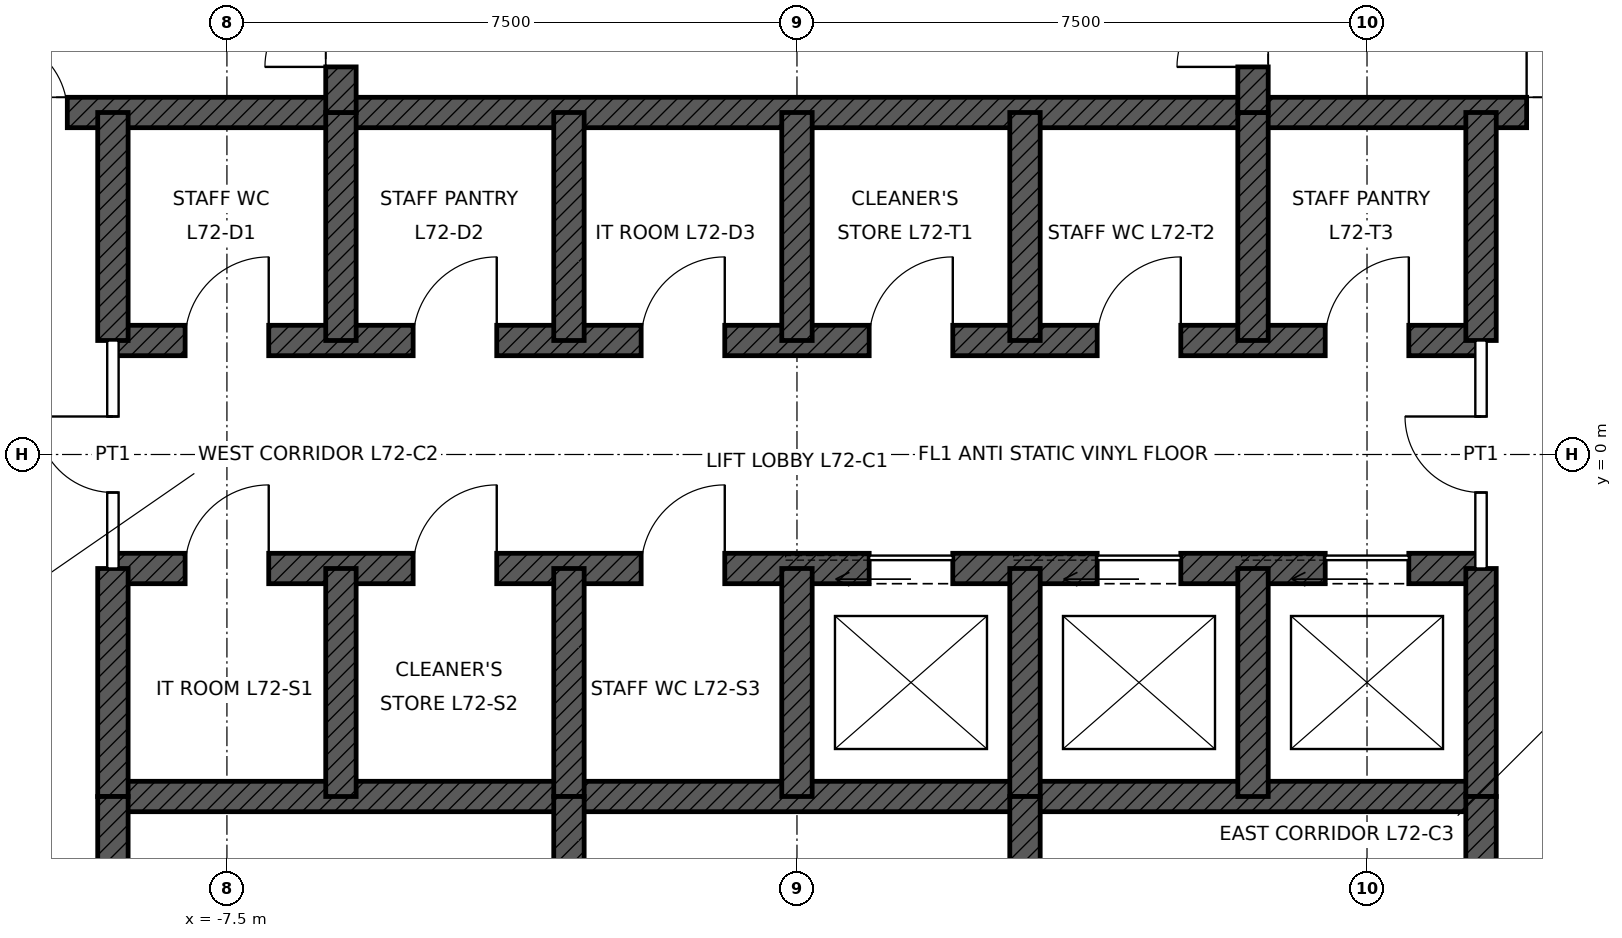
"""IFC4 building model, lengths in metres.
Left out: names, types, materials, properties, quantities, classifications, styles, units other than length and angle.
Written with IfcOpenShell. Run it as: python <this file> out.ifc"""

import sys

from ifc_helpers import new_model, si_unit, direction, frame, frame_2d, origin, place, context, subcontext, project, spatial, rectangle, extrude, element, fill, save


model = new_model("IFC4")
c1 = context("Model", 3, precision=1e-05, world=origin(), true_north=direction((0.0, 1.0)))
c2 = subcontext(c1, "Body", "Model", "MODEL_VIEW")
j1 = project(units=[si_unit("LENGTHUNIT", "METRE"), si_unit("PLANEANGLEUNIT", "RADIAN")], contexts=[c1])
p1 = place(None, origin())
s1 = spatial("IfcSite", under=j1, at=p1, CompositionType="ELEMENT")
p2 = place(p1, origin())
s2 = spatial("IfcBuilding", under=s1, at=p2, CompositionType="ELEMENT")
p3 = place(p2, frame((0.0, 0.0, 323.9)))
s3 = spatial("IfcBuildingStorey", under=s2, at=p3, CompositionType="ELEMENT", Elevation=323.9)
p4 = place(p3, frame((-11.0, 4.5, 0.0), z_axis=(0.0, 0.0, 1.0), x_axis=(1.0, 0.0, 0.0)))
e1 = element("IfcWall", 1, at=p4, inside=s3, PredefinedType="SHEAR", context=c2, shape_type="SweptSolid", body=[
    extrude(rectangle(XDim=22.0, YDim=0.4, at=frame_2d((11.0, 0.0))), origin(), (0.0, 0.0, 1.0), 4.0),
])
p5 = place(p4, frame((0.4, 0.0, 0.0)))
e2 = element("IfcOpeningElement", 2, at=p5, cuts=e1, PredefinedType="OPENING", context=c2, shape_type="SweptSolid", body=[
    extrude(rectangle(XDim=1.0, YDim=2.1, at=frame_2d((0.5, 1.05))), frame((0.0, 0.21, 0.0), z_axis=(0.0, -1.0, 0.0), x_axis=(1.0, 0.0, 0.0)), (0.0, 0.0, 1.0), 0.42),
])
p6 = place(p4, frame((20.6, 0.0, 0.0)))
e3 = element("IfcOpeningElement", 3, at=p6, cuts=e1, PredefinedType="OPENING", context=c2, shape_type="SweptSolid", body=[
    extrude(rectangle(XDim=1.0, YDim=2.1, at=frame_2d((0.5, 1.05))), frame((0.0, 0.21, 0.0), z_axis=(0.0, -1.0, 0.0), x_axis=(1.0, 0.0, 0.0)), (0.0, 0.0, 1.0), 0.42),
])
p7 = place(p3, frame((-9.0, 1.5, 0.0), z_axis=(0.0, 0.0, 1.0), x_axis=(1.0, 0.0, 0.0)))
e4 = element("IfcWall", 4, at=p7, inside=s3, PredefinedType="SHEAR", context=c2, shape_type="SweptSolid", body=[
    extrude(rectangle(XDim=18.0, YDim=0.4, at=frame_2d((9.0, 0.0))), origin(), (0.0, 0.0, 1.0), 4.0),
])
p8 = place(p7, frame((0.95, 0.0, 0.0)))
e5 = element("IfcOpeningElement", 5, at=p8, cuts=e4, PredefinedType="OPENING", context=c2, shape_type="SweptSolid", body=[
    extrude(rectangle(XDim=1.1, YDim=2.1, at=frame_2d((0.55, 1.05))), frame((0.0, 0.21, 0.0), z_axis=(0.0, -1.0, 0.0), x_axis=(1.0, 0.0, 0.0)), (0.0, 0.0, 1.0), 0.42),
])
p9 = place(p7, frame((3.95, 0.0, 0.0)))
e6 = element("IfcOpeningElement", 6, at=p9, cuts=e4, PredefinedType="OPENING", context=c2, shape_type="SweptSolid", body=[
    extrude(rectangle(XDim=1.1, YDim=2.1, at=frame_2d((0.55, 1.05))), frame((0.0, 0.21, 0.0), z_axis=(0.0, -1.0, 0.0), x_axis=(1.0, 0.0, 0.0)), (0.0, 0.0, 1.0), 0.42),
])
p10 = place(p7, frame((6.95, 0.0, 0.0)))
e7 = element("IfcOpeningElement", 7, at=p10, cuts=e4, PredefinedType="OPENING", context=c2, shape_type="SweptSolid", body=[
    extrude(rectangle(XDim=1.1, YDim=2.1, at=frame_2d((0.55, 1.05))), frame((0.0, 0.21, 0.0), z_axis=(0.0, -1.0, 0.0), x_axis=(1.0, 0.0, 0.0)), (0.0, 0.0, 1.0), 0.42),
])
p11 = place(p7, frame((9.95, 0.0, 0.0)))
e8 = element("IfcOpeningElement", 8, at=p11, cuts=e4, PredefinedType="OPENING", context=c2, shape_type="SweptSolid", body=[
    extrude(rectangle(XDim=1.1, YDim=2.1, at=frame_2d((0.55, 1.05))), frame((0.0, 0.21, 0.0), z_axis=(0.0, -1.0, 0.0), x_axis=(1.0, 0.0, 0.0)), (0.0, 0.0, 1.0), 0.42),
])
p12 = place(p7, frame((12.95, 0.0, 0.0)))
e9 = element("IfcOpeningElement", 9, at=p12, cuts=e4, PredefinedType="OPENING", context=c2, shape_type="SweptSolid", body=[
    extrude(rectangle(XDim=1.1, YDim=2.1, at=frame_2d((0.55, 1.05))), frame((0.0, 0.21, 0.0), z_axis=(0.0, -1.0, 0.0), x_axis=(1.0, 0.0, 0.0)), (0.0, 0.0, 1.0), 0.42),
])
p13 = place(p7, frame((15.95, 0.0, 0.0)))
e10 = element("IfcOpeningElement", 10, at=p13, cuts=e4, PredefinedType="OPENING", context=c2, shape_type="SweptSolid", body=[
    extrude(rectangle(XDim=1.1, YDim=2.1, at=frame_2d((0.55, 1.05))), frame((0.0, 0.21, 0.0), z_axis=(0.0, -1.0, 0.0), x_axis=(1.0, 0.0, 0.0)), (0.0, 0.0, 1.0), 0.42),
])
p14 = place(p3, frame((-9.0, -1.5, 0.0), z_axis=(0.0, 0.0, 1.0), x_axis=(1.0, 0.0, 0.0)))
e11 = element("IfcWall", 11, at=p14, inside=s3, PredefinedType="SHEAR", context=c2, shape_type="SweptSolid", body=[
    extrude(rectangle(XDim=18.0, YDim=0.4, at=frame_2d((9.0, 0.0))), origin(), (0.0, 0.0, 1.0), 4.0),
])
p15 = place(p14, frame((9.95, 0.0, 0.0)))
e12 = element("IfcOpeningElement", 12, at=p15, cuts=e11, PredefinedType="OPENING", context=c2, shape_type="SweptSolid", body=[
    extrude(rectangle(XDim=1.1, YDim=2.1, at=frame_2d((0.55, 1.05))), frame((0.0, 0.21, 0.0), z_axis=(0.0, -1.0, 0.0), x_axis=(1.0, 0.0, 0.0)), (0.0, 0.0, 1.0), 0.42),
])
p16 = place(p14, frame((12.95, 0.0, 0.0)))
e13 = element("IfcOpeningElement", 13, at=p16, cuts=e11, PredefinedType="OPENING", context=c2, shape_type="SweptSolid", body=[
    extrude(rectangle(XDim=1.1, YDim=2.1, at=frame_2d((0.55, 1.05))), frame((0.0, 0.21, 0.0), z_axis=(0.0, -1.0, 0.0), x_axis=(1.0, 0.0, 0.0)), (0.0, 0.0, 1.0), 0.42),
])
p17 = place(p14, frame((15.95, 0.0, 0.0)))
e14 = element("IfcOpeningElement", 14, at=p17, cuts=e11, PredefinedType="OPENING", context=c2, shape_type="SweptSolid", body=[
    extrude(rectangle(XDim=1.1, YDim=2.1, at=frame_2d((0.55, 1.05))), frame((0.0, 0.21, 0.0), z_axis=(0.0, -1.0, 0.0), x_axis=(1.0, 0.0, 0.0)), (0.0, 0.0, 1.0), 0.42),
])
p18 = place(p14, frame((0.95, 0.0, 0.0)))
e15 = element("IfcOpeningElement", 15, at=p18, cuts=e11, PredefinedType="OPENING", context=c2, shape_type="SweptSolid", body=[
    extrude(rectangle(XDim=1.1, YDim=2.1, at=frame_2d((0.55, 1.05))), frame((0.0, 0.21, 0.0), z_axis=(0.0, -1.0, 0.0), x_axis=(1.0, 0.0, 0.0)), (0.0, 0.0, 1.0), 0.42),
])
p19 = place(p14, frame((3.95, 0.0, 0.0)))
e16 = element("IfcOpeningElement", 16, at=p19, cuts=e11, PredefinedType="OPENING", context=c2, shape_type="SweptSolid", body=[
    extrude(rectangle(XDim=1.1, YDim=2.1, at=frame_2d((0.55, 1.05))), frame((0.0, 0.21, 0.0), z_axis=(0.0, -1.0, 0.0), x_axis=(1.0, 0.0, 0.0)), (0.0, 0.0, 1.0), 0.42),
])
p20 = place(p14, frame((6.95, 0.0, 0.0)))
e17 = element("IfcOpeningElement", 17, at=p20, cuts=e11, PredefinedType="OPENING", context=c2, shape_type="SweptSolid", body=[
    extrude(rectangle(XDim=1.1, YDim=2.1, at=frame_2d((0.55, 1.05))), frame((0.0, 0.21, 0.0), z_axis=(0.0, -1.0, 0.0), x_axis=(1.0, 0.0, 0.0)), (0.0, 0.0, 1.0), 0.42),
])
p21 = place(p3, frame((-9.0, -4.5, 0.0), z_axis=(0.0, 0.0, 1.0), x_axis=(1.0, 0.0, 0.0)))
e18 = element("IfcWall", 18, at=p21, inside=s3, PredefinedType="SHEAR", context=c2, shape_type="SweptSolid", body=[
    extrude(rectangle(XDim=18.0, YDim=0.4, at=frame_2d((9.0, 0.0))), origin(), (0.0, 0.0, 1.0), 4.0),
])
for number, where, z_axis, x_axis in (
    (19, (-9.0, 1.5, 0.0), (0.0, 0.0, 1.0), (0.0, 1.0, 0.0)),
    (20, (9.0, 1.5, 0.0), (0.0, 0.0, 1.0), (0.0, 1.0, 0.0)),
    (21, (-9.0, -4.5, 0.0), (0.0, 0.0, 1.0), (0.0, 1.0, 0.0)),
    (22, (9.0, -4.5, 0.0), (0.0, 0.0, 1.0), (0.0, 1.0, 0.0)),
    (23, (-6.0, 1.5, 0.0), (0.0, 0.0, 1.0), (0.0, 1.0, 0.0)),
    (24, (-3.0, 1.5, 0.0), (0.0, 0.0, 1.0), (0.0, 1.0, 0.0)),
    (25, (0.0, 1.5, 0.0), (0.0, 0.0, 1.0), (0.0, 1.0, 0.0)),
    (26, (3.0, 1.5, 0.0), (0.0, 0.0, 1.0), (0.0, 1.0, 0.0)),
    (27, (6.0, 1.5, 0.0), (0.0, 0.0, 1.0), (0.0, 1.0, 0.0)),
    (28, (-6.0, -4.5, 0.0), (0.0, 0.0, 1.0), (0.0, 1.0, 0.0)),
    (29, (-3.0, -4.5, 0.0), (0.0, 0.0, 1.0), (0.0, 1.0, 0.0)),
    (30, (0.0, -4.5, 0.0), (0.0, 0.0, 1.0), (0.0, 1.0, 0.0)),
    (31, (3.0, -4.5, 0.0), (0.0, 0.0, 1.0), (0.0, 1.0, 0.0)),
    (32, (6.0, -4.5, 0.0), (0.0, 0.0, 1.0), (0.0, 1.0, 0.0)),
):
    element("IfcWall", number, at=place(p3, frame(where, z_axis=z_axis, x_axis=x_axis)), inside=s3, PredefinedType="SHEAR", context=c2, shape_type="SweptSolid", body=[
        extrude(rectangle(XDim=3.0, YDim=0.4, at=frame_2d((1.5, 0.0))), origin(), (0.0, 0.0, 1.0), 4.0),
    ])
p22 = place(p3, frame((-6.0, 4.5, 0.0), z_axis=(0.0, 0.0, 1.0), x_axis=(0.0, 1.0, 0.0)))
e33 = element("IfcWall", 33, at=p22, inside=s3, PredefinedType="SHEAR", context=c2, shape_type="SweptSolid", body=[
    extrude(rectangle(XDim=6.5, YDim=0.4, at=frame_2d((3.25, 0.0))), origin(), (0.0, 0.0, 1.0), 4.0),
])
p23 = place(p22, frame((0.6, 0.0, 0.0)))
e34 = element("IfcOpeningElement", 34, at=p23, cuts=e33, PredefinedType="OPENING", context=c2, shape_type="SweptSolid", body=[
    extrude(rectangle(XDim=1.0, YDim=2.1, at=frame_2d((0.5, 1.05))), frame((0.0, 0.21, 0.0), z_axis=(0.0, -1.0, 0.0), x_axis=(1.0, 0.0, 0.0)), (0.0, 0.0, 1.0), 0.42),
])
p24 = place(p3, frame((6.0, 4.5, 0.0), z_axis=(0.0, 0.0, 1.0), x_axis=(0.0, 1.0, 0.0)))
e35 = element("IfcWall", 35, at=p24, inside=s3, PredefinedType="SHEAR", context=c2, shape_type="SweptSolid", body=[
    extrude(rectangle(XDim=6.5, YDim=0.4, at=frame_2d((3.25, 0.0))), origin(), (0.0, 0.0, 1.0), 4.0),
])
p25 = place(p24, frame((0.6, 0.0, 0.0)))
e36 = element("IfcOpeningElement", 36, at=p25, cuts=e35, PredefinedType="OPENING", context=c2, shape_type="SweptSolid", body=[
    extrude(rectangle(XDim=1.0, YDim=2.1, at=frame_2d((0.5, 1.05))), frame((0.0, 0.21, 0.0), z_axis=(0.0, -1.0, 0.0), x_axis=(1.0, 0.0, 0.0)), (0.0, 0.0, 1.0), 0.42),
])
p26 = place(p3, frame((-9.0, -11.0, 0.0), z_axis=(0.0, 0.0, 1.0), x_axis=(0.0, 1.0, 0.0)))
e37 = element("IfcWall", 37, at=p26, inside=s3, PredefinedType="SHEAR", context=c2, shape_type="SweptSolid", body=[
    extrude(rectangle(XDim=6.5, YDim=0.4, at=frame_2d((3.25, 0.0))), origin(), (0.0, 0.0, 1.0), 4.0),
])
p27 = place(p26, frame((4.25, 0.0, 0.0)))
e38 = element("IfcOpeningElement", 38, at=p27, cuts=e37, PredefinedType="OPENING", context=c2, shape_type="SweptSolid", body=[
    extrude(rectangle(XDim=1.0, YDim=2.1, at=frame_2d((0.5, 1.05))), frame((0.0, 0.21, 0.0), z_axis=(0.0, -1.0, 0.0), x_axis=(1.0, 0.0, 0.0)), (0.0, 0.0, 1.0), 0.42),
])
p28 = place(p3, frame((9.0, -11.0, 0.0), z_axis=(0.0, 0.0, 1.0), x_axis=(0.0, 1.0, 0.0)))
e39 = element("IfcWall", 39, at=p28, inside=s3, PredefinedType="SHEAR", context=c2, shape_type="SweptSolid", body=[
    extrude(rectangle(XDim=6.5, YDim=0.4, at=frame_2d((3.25, 0.0))), origin(), (0.0, 0.0, 1.0), 4.0),
])
p29 = place(p28, frame((4.25, 0.0, 0.0)))
e40 = element("IfcOpeningElement", 40, at=p29, cuts=e39, PredefinedType="OPENING", context=c2, shape_type="SweptSolid", body=[
    extrude(rectangle(XDim=1.0, YDim=2.1, at=frame_2d((0.5, 1.05))), frame((0.0, 0.21, 0.0), z_axis=(0.0, -1.0, 0.0), x_axis=(1.0, 0.0, 0.0)), (0.0, 0.0, 1.0), 0.42),
])
for number, where, z_axis, x_axis in (
    (41, (-3.0, -11.0, 0.0), (0.0, 0.0, 1.0), (0.0, 1.0, 0.0)),
    (42, (3.0, -11.0, 0.0), (0.0, 0.0, 1.0), (0.0, 1.0, 0.0)),
):
    element("IfcWall", number, at=place(p3, frame(where, z_axis=z_axis, x_axis=x_axis)), inside=s3, PredefinedType="SHEAR", context=c2, shape_type="SweptSolid", body=[
        extrude(rectangle(XDim=6.5, YDim=0.4, at=frame_2d((3.25, 0.0))), origin(), (0.0, 0.0, 1.0), 4.0),
    ])
p30 = place(p3, frame((-9.0, -1.5, 0.0), z_axis=(0.0, 0.0, 1.0), x_axis=(0.0, 1.0, 0.0)))
e43 = element("IfcWall", 43, at=p30, inside=s3, PredefinedType="PARTITIONING", context=c2, shape_type="SweptSolid", body=[
    extrude(rectangle(XDim=3.0, YDim=0.15, at=frame_2d((1.5, 0.0))), origin(), (0.0, 0.0, 1.0), 3.75),
])
p31 = place(p30, frame((1.0, 0.0, 0.0)))
e44 = element("IfcOpeningElement", 44, at=p31, cuts=e43, PredefinedType="OPENING", context=c2, shape_type="SweptSolid", body=[
    extrude(rectangle(XDim=1.0, YDim=2.4, at=frame_2d((0.5, 1.2))), frame((0.0, 0.085, 0.0), z_axis=(0.0, -1.0, 0.0), x_axis=(1.0, 0.0, 0.0)), (0.0, 0.0, 1.0), 0.17),
])
p32 = place(p3, frame((9.0, -1.5, 0.0), z_axis=(0.0, 0.0, 1.0), x_axis=(0.0, 1.0, 0.0)))
e45 = element("IfcWall", 45, at=p32, inside=s3, PredefinedType="PARTITIONING", context=c2, shape_type="SweptSolid", body=[
    extrude(rectangle(XDim=3.0, YDim=0.15, at=frame_2d((1.5, 0.0))), origin(), (0.0, 0.0, 1.0), 3.75),
])
p33 = place(p32, frame((1.0, 0.0, 0.0)))
e46 = element("IfcOpeningElement", 46, at=p33, cuts=e45, PredefinedType="OPENING", context=c2, shape_type="SweptSolid", body=[
    extrude(rectangle(XDim=1.0, YDim=2.4, at=frame_2d((0.5, 1.2))), frame((0.0, 0.085, 0.0), z_axis=(0.0, -1.0, 0.0), x_axis=(1.0, 0.0, 0.0)), (0.0, 0.0, 1.0), 0.17),
])
p34 = place(p5, origin())
e47 = element("IfcDoor", 47, at=p34, inside=s3, OperationType="SINGLE_SWING_LEFT", PredefinedType="DOOR", context=c2, shape_type="SweptSolid", body=[
    extrude(rectangle(XDim=1.0, YDim=2.1, at=frame_2d((0.5, 1.05))), frame((0.0, 0.025, 0.0), z_axis=(0.0, -1.0, 0.0), x_axis=(1.0, 0.0, 0.0)), (0.0, 0.0, 1.0), 0.05),
])
fill(e2, e47)
p35 = place(p6, origin())
e48 = element("IfcDoor", 48, at=p35, inside=s3, OperationType="SINGLE_SWING_LEFT", PredefinedType="DOOR", context=c2, shape_type="SweptSolid", body=[
    extrude(rectangle(XDim=1.0, YDim=2.1, at=frame_2d((0.5, 1.05))), frame((0.0, 0.025, 0.0), z_axis=(0.0, -1.0, 0.0), x_axis=(1.0, 0.0, 0.0)), (0.0, 0.0, 1.0), 0.05),
])
fill(e3, e48)
p36 = place(p23, origin())
e49 = element("IfcDoor", 49, at=p36, inside=s3, OperationType="SINGLE_SWING_LEFT", PredefinedType="DOOR", context=c2, shape_type="SweptSolid", body=[
    extrude(rectangle(XDim=1.0, YDim=2.1, at=frame_2d((0.5, 1.05))), frame((0.0, 0.025, 0.0), z_axis=(0.0, -1.0, 0.0), x_axis=(1.0, 0.0, 0.0)), (0.0, 0.0, 1.0), 0.05),
])
fill(e34, e49)
p37 = place(p25, origin())
e50 = element("IfcDoor", 50, at=p37, inside=s3, OperationType="SINGLE_SWING_LEFT", PredefinedType="DOOR", context=c2, shape_type="SweptSolid", body=[
    extrude(rectangle(XDim=1.0, YDim=2.1, at=frame_2d((0.5, 1.05))), frame((0.0, 0.025, 0.0), z_axis=(0.0, -1.0, 0.0), x_axis=(1.0, 0.0, 0.0)), (0.0, 0.0, 1.0), 0.05),
])
fill(e36, e50)
p38 = place(p15, origin())
e51 = element("IfcDoor", 51, at=p38, inside=s3, OperationType="SLIDING_TO_LEFT", PredefinedType="DOOR", context=c2, shape_type="SweptSolid", body=[
    extrude(rectangle(XDim=1.1, YDim=2.1, at=frame_2d((0.55, 1.05))), frame((0.0, 0.025, 0.0), z_axis=(0.0, -1.0, 0.0), x_axis=(1.0, 0.0, 0.0)), (0.0, 0.0, 1.0), 0.05),
])
fill(e12, e51)
p39 = place(p16, origin())
e52 = element("IfcDoor", 52, at=p39, inside=s3, OperationType="SLIDING_TO_LEFT", PredefinedType="DOOR", context=c2, shape_type="SweptSolid", body=[
    extrude(rectangle(XDim=1.1, YDim=2.1, at=frame_2d((0.55, 1.05))), frame((0.0, 0.025, 0.0), z_axis=(0.0, -1.0, 0.0), x_axis=(1.0, 0.0, 0.0)), (0.0, 0.0, 1.0), 0.05),
])
fill(e13, e52)
p40 = place(p17, origin())
e53 = element("IfcDoor", 53, at=p40, inside=s3, OperationType="SLIDING_TO_LEFT", PredefinedType="DOOR", context=c2, shape_type="SweptSolid", body=[
    extrude(rectangle(XDim=1.1, YDim=2.1, at=frame_2d((0.55, 1.05))), frame((0.0, 0.025, 0.0), z_axis=(0.0, -1.0, 0.0), x_axis=(1.0, 0.0, 0.0)), (0.0, 0.0, 1.0), 0.05),
])
fill(e14, e53)
p41 = place(p31, origin())
e54 = element("IfcDoor", 54, at=p41, inside=s3, OperationType="SINGLE_SWING_RIGHT", PredefinedType="DOOR", context=c2, shape_type="SweptSolid", body=[
    extrude(rectangle(XDim=1.0, YDim=2.4, at=frame_2d((0.5, 1.2))), frame((0.0, 0.025, 0.0), z_axis=(0.0, -1.0, 0.0), x_axis=(1.0, 0.0, 0.0)), (0.0, 0.0, 1.0), 0.05),
])
fill(e44, e54)
p42 = place(p33, origin())
e55 = element("IfcDoor", 55, at=p42, inside=s3, OperationType="SINGLE_SWING_RIGHT", PredefinedType="DOOR", context=c2, shape_type="SweptSolid", body=[
    extrude(rectangle(XDim=1.0, YDim=2.4, at=frame_2d((0.5, 1.2))), frame((0.0, 0.025, 0.0), z_axis=(0.0, -1.0, 0.0), x_axis=(1.0, 0.0, 0.0)), (0.0, 0.0, 1.0), 0.05),
])
fill(e46, e55)
p43 = place(p8, origin())
e56 = element("IfcDoor", 56, at=p43, inside=s3, OperationType="SINGLE_SWING_RIGHT", PredefinedType="DOOR", context=c2, shape_type="SweptSolid", body=[
    extrude(rectangle(XDim=1.1, YDim=2.1, at=frame_2d((0.55, 1.05))), frame((0.0, 0.025, 0.0), z_axis=(0.0, -1.0, 0.0), x_axis=(1.0, 0.0, 0.0)), (0.0, 0.0, 1.0), 0.05),
])
fill(e5, e56)
p44 = place(p9, origin())
e57 = element("IfcDoor", 57, at=p44, inside=s3, OperationType="SINGLE_SWING_RIGHT", PredefinedType="DOOR", context=c2, shape_type="SweptSolid", body=[
    extrude(rectangle(XDim=1.1, YDim=2.1, at=frame_2d((0.55, 1.05))), frame((0.0, 0.025, 0.0), z_axis=(0.0, -1.0, 0.0), x_axis=(1.0, 0.0, 0.0)), (0.0, 0.0, 1.0), 0.05),
])
fill(e6, e57)
p45 = place(p10, origin())
e58 = element("IfcDoor", 58, at=p45, inside=s3, OperationType="SINGLE_SWING_RIGHT", PredefinedType="DOOR", context=c2, shape_type="SweptSolid", body=[
    extrude(rectangle(XDim=1.1, YDim=2.1, at=frame_2d((0.55, 1.05))), frame((0.0, 0.025, 0.0), z_axis=(0.0, -1.0, 0.0), x_axis=(1.0, 0.0, 0.0)), (0.0, 0.0, 1.0), 0.05),
])
fill(e7, e58)
p46 = place(p11, origin())
e59 = element("IfcDoor", 59, at=p46, inside=s3, OperationType="SINGLE_SWING_RIGHT", PredefinedType="DOOR", context=c2, shape_type="SweptSolid", body=[
    extrude(rectangle(XDim=1.1, YDim=2.1, at=frame_2d((0.55, 1.05))), frame((0.0, 0.025, 0.0), z_axis=(0.0, -1.0, 0.0), x_axis=(1.0, 0.0, 0.0)), (0.0, 0.0, 1.0), 0.05),
])
fill(e8, e59)
p47 = place(p12, origin())
e60 = element("IfcDoor", 60, at=p47, inside=s3, OperationType="SINGLE_SWING_RIGHT", PredefinedType="DOOR", context=c2, shape_type="SweptSolid", body=[
    extrude(rectangle(XDim=1.1, YDim=2.1, at=frame_2d((0.55, 1.05))), frame((0.0, 0.025, 0.0), z_axis=(0.0, -1.0, 0.0), x_axis=(1.0, 0.0, 0.0)), (0.0, 0.0, 1.0), 0.05),
])
fill(e9, e60)
p48 = place(p13, origin())
e61 = element("IfcDoor", 61, at=p48, inside=s3, OperationType="SINGLE_SWING_RIGHT", PredefinedType="DOOR", context=c2, shape_type="SweptSolid", body=[
    extrude(rectangle(XDim=1.1, YDim=2.1, at=frame_2d((0.55, 1.05))), frame((0.0, 0.025, 0.0), z_axis=(0.0, -1.0, 0.0), x_axis=(1.0, 0.0, 0.0)), (0.0, 0.0, 1.0), 0.05),
])
fill(e10, e61)
p49 = place(p18, origin())
e62 = element("IfcDoor", 62, at=p49, inside=s3, OperationType="SINGLE_SWING_RIGHT", PredefinedType="DOOR", context=c2, shape_type="SweptSolid", body=[
    extrude(rectangle(XDim=1.1, YDim=2.1, at=frame_2d((0.55, 1.05))), frame((0.0, 0.025, 0.0), z_axis=(0.0, -1.0, 0.0), x_axis=(1.0, 0.0, 0.0)), (0.0, 0.0, 1.0), 0.05),
])
fill(e15, e62)
p50 = place(p19, origin())
e63 = element("IfcDoor", 63, at=p50, inside=s3, OperationType="SINGLE_SWING_RIGHT", PredefinedType="DOOR", context=c2, shape_type="SweptSolid", body=[
    extrude(rectangle(XDim=1.1, YDim=2.1, at=frame_2d((0.55, 1.05))), frame((0.0, 0.025, 0.0), z_axis=(0.0, -1.0, 0.0), x_axis=(1.0, 0.0, 0.0)), (0.0, 0.0, 1.0), 0.05),
])
fill(e16, e63)
p51 = place(p20, origin())
e64 = element("IfcDoor", 64, at=p51, inside=s3, OperationType="SINGLE_SWING_RIGHT", PredefinedType="DOOR", context=c2, shape_type="SweptSolid", body=[
    extrude(rectangle(XDim=1.1, YDim=2.1, at=frame_2d((0.55, 1.05))), frame((0.0, 0.025, 0.0), z_axis=(0.0, -1.0, 0.0), x_axis=(1.0, 0.0, 0.0)), (0.0, 0.0, 1.0), 0.05),
])
fill(e17, e64)
save(model, sys.argv[1])
